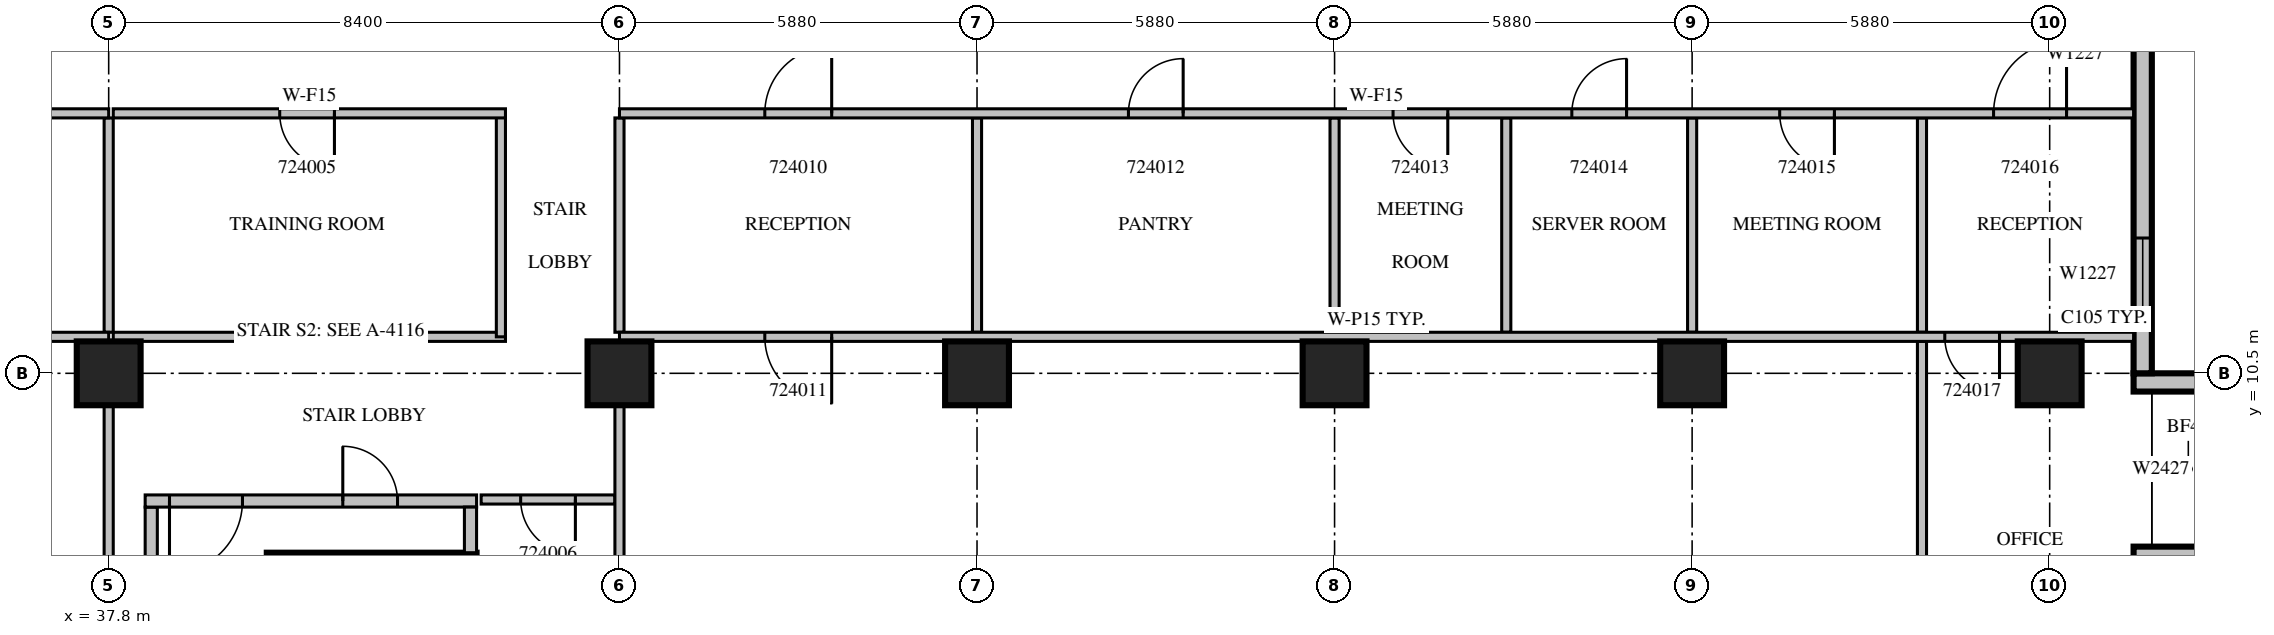
"""IFC4 building model, lengths in metres.
Left out: names, types, materials, properties, quantities, classifications, styles, units other than length and angle.
Written with IfcOpenShell. Run it as: python <this file> out.ifc"""

import sys

from ifc_helpers import new_model, si_unit, direction, frame, frame_2d, origin, origin_2d, place, context, subcontext, project, spatial, rectangle, extrude, source, transform, mapped, element, fill, save


model = new_model("IFC4")
c1 = context("Model", 3, precision=1e-05, world=origin(), true_north=direction((0.0, 1.0)))
c2 = subcontext(c1, "Body", "Model", "MODEL_VIEW")
j1 = project(units=[si_unit("LENGTHUNIT", "METRE"), si_unit("PLANEANGLEUNIT", "RADIAN")], contexts=[c1])
p1 = place(None, origin())
s1 = spatial("IfcSite", under=j1, at=p1, CompositionType="ELEMENT")
p2 = place(p1, origin())
s2 = spatial("IfcBuilding", under=s1, at=p2, CompositionType="ELEMENT")
p3 = place(p2, frame((0.0, 0.0, 111.9)))
s3 = spatial("IfcBuildingStorey", under=s2, at=p3, CompositionType="ELEMENT", Elevation=111.9)
m1 = source(origin(), c2, "Body", "SweptSolid", [
    extrude(rectangle(XDim=1.05, YDim=1.05, at=origin_2d()), origin(), (0.0, 0.0, 1.0), 4.2),
])
for number, where, z_axis, x_axis in (
    (1, (37.8, 10.5, 0.0), (0.0, 0.0, 1.0), (1.0, 0.0, 0.0)),
    (2, (46.2, 10.5, 0.0), (0.0, 0.0, 1.0), (1.0, 0.0, 0.0)),
    (3, (52.08, 10.5, 0.0), (0.0, 0.0, 1.0), (1.0, 0.0, 0.0)),
    (4, (57.96, 10.5, 0.0), (0.0, 0.0, 1.0), (1.0, 0.0, 0.0)),
    (5, (63.84, 10.5, 0.0), (0.0, 0.0, 1.0), (1.0, 0.0, 0.0)),
    (6, (69.72, 10.5, 0.0), (0.0, 0.0, 1.0), (1.0, 0.0, 0.0)),
):
    element("IfcColumn", number, at=place(p3, frame(where, z_axis=z_axis, x_axis=x_axis)), inside=s3, PredefinedType="COLUMN", context=c2, shape_type="MappedRepresentation", body=[
        mapped(m1, transform((0.0, 0.0, 0.0), scale=1.0)),
    ])
m2 = source(origin(), c2, "Body", "SweptSolid", [
    extrude(rectangle(XDim=1.2, YDim=0.3, at=frame_2d((0.6, 0.0))), origin(), (0.0, 0.0, 1.0), 3.8),
])
for number, where, z_axis, x_axis in (
    (7, (71.1, 7.5, 0.0), (0.0, 0.0, 1.0), (1.0, 0.0, 0.0)),
    (8, (71.1, 10.35, 0.0), (0.0, 0.0, 1.0), (1.0, 0.0, 0.0)),
):
    element("IfcWall", number, at=place(p3, frame(where, z_axis=z_axis, x_axis=x_axis)), inside=s3, PredefinedType="STANDARD", context=c2, shape_type="MappedRepresentation", body=[
        mapped(m2, transform((0.0, 0.0, 0.0), scale=1.0)),
    ])
m3 = source(origin(), c2, "Body", "SweptSolid", [
    extrude(rectangle(XDim=6.3, YDim=0.3, at=frame_2d((3.15, 0.0))), origin(), (0.0, 0.0, 1.0), 3.8),
])
p4 = place(p3, frame((71.25, 10.5, 0.0), z_axis=(0.0, 0.0, 1.0), x_axis=(0.0, 1.0, 0.0)))
e9 = element("IfcWall", 9, at=p4, inside=s3, PredefinedType="STANDARD", context=c2, shape_type="MappedRepresentation", body=[
    mapped(m3, transform((0.0, 0.0, 0.0), scale=1.0)),
])
m4 = source(origin(), c2, "Body", "SweptSolid", [
    extrude(rectangle(XDim=1.2, YDim=2.7, at=frame_2d((0.6, 1.35))), frame((0.0, 0.16, 0.0), z_axis=(0.0, -1.0, 0.0), x_axis=(1.0, 0.0, 0.0)), (0.0, 0.0, 1.0), 0.32),
])
p5 = place(p4, frame((1.025, 0.0, 0.6)))
e10 = element("IfcOpeningElement", 10, at=p5, cuts=e9, PredefinedType="OPENING", context=c2, shape_type="MappedRepresentation", body=[
    mapped(m4, transform((0.0, 0.0, 0.0), scale=1.0)),
])
m5 = source(origin(), c2, "Body", "SweptSolid", [
    extrude(rectangle(XDim=3.45, YDim=0.25, at=frame_2d((1.725, 0.0))), origin(), (0.0, 0.0, 1.0), 3.8),
])
p6 = place(p3, frame((40.4, 7.425, 0.0), z_axis=(0.0, 0.0, 1.0), x_axis=(1.0, 0.0, 0.0)))
e11 = element("IfcWall", 11, at=p6, inside=s3, PredefinedType="SOLIDWALL", context=c2, shape_type="MappedRepresentation", body=[
    mapped(m5, transform((0.0, 0.0, 0.0), scale=1.0)),
])
m6 = source(origin(), c2, "Body", "SweptSolid", [
    extrude(rectangle(XDim=8.0, YDim=0.2, at=frame_2d((4.0, 0.0))), origin(), (0.0, 0.0, 1.0), 3.8),
])
p7 = place(p3, frame((38.5, 0.3, 0.0), z_axis=(0.0, 0.0, 1.0), x_axis=(0.0, 1.0, 0.0)))
e12 = element("IfcWall", 12, at=p7, inside=s3, PredefinedType="PARTITIONING", context=c2, shape_type="MappedRepresentation", body=[
    mapped(m6, transform((0.0, 0.0, 0.0), scale=1.0)),
])
m7 = source(origin(), c2, "Body", "SweptSolid", [
    extrude(rectangle(XDim=5.45, YDim=0.2, at=frame_2d((2.725, 0.0))), origin(), (0.0, 0.0, 1.0), 3.8),
])
p8 = place(p3, frame((38.4, 8.4, 0.0), z_axis=(0.0, 0.0, 1.0), x_axis=(1.0, 0.0, 0.0)))
e13 = element("IfcWall", 13, at=p8, inside=s3, PredefinedType="PARTITIONING", context=c2, shape_type="MappedRepresentation", body=[
    mapped(m7, transform((0.0, 0.0, 0.0), scale=1.0)),
])
m8 = source(origin(), c2, "Body", "SweptSolid", [
    extrude(rectangle(XDim=1.2, YDim=2.1, at=frame_2d((0.6, 1.05))), frame((0.0, 0.11, 0.0), z_axis=(0.0, -1.0, 0.0), x_axis=(1.0, 0.0, 0.0)), (0.0, 0.0, 1.0), 0.22),
])
p9 = place(p8, frame((0.4, 0.0, 0.0)))
e14 = element("IfcOpeningElement", 14, at=p9, cuts=e13, PredefinedType="OPENING", context=c2, shape_type="MappedRepresentation", body=[
    mapped(m8, transform((0.0, 0.0, 0.0), scale=1.0)),
])
m9 = source(origin(), c2, "Body", "SweptSolid", [
    extrude(rectangle(XDim=0.9, YDim=2.1, at=frame_2d((0.45, 1.05))), frame((0.0, 0.11, 0.0), z_axis=(0.0, -1.0, 0.0), x_axis=(1.0, 0.0, 0.0)), (0.0, 0.0, 1.0), 0.22),
])
p10 = place(p8, frame((3.25, 0.0, 0.0)))
e15 = element("IfcOpeningElement", 15, at=p10, cuts=e13, PredefinedType="OPENING", context=c2, shape_type="MappedRepresentation", body=[
    mapped(m9, transform((0.0, 0.0, 0.0), scale=1.0)),
])
m10 = source(origin(), c2, "Body", "SweptSolid", [
    extrude(rectangle(XDim=0.75, YDim=0.2, at=frame_2d((0.375, 0.0))), origin(), (0.0, 0.0, 1.0), 3.8),
])
p11 = place(p3, frame((43.75, 7.55, 0.0), z_axis=(0.0, 0.0, 1.0), x_axis=(0.0, 1.0, 0.0)))
e16 = element("IfcWall", 16, at=p11, inside=s3, PredefinedType="PARTITIONING", context=c2, shape_type="MappedRepresentation", body=[
    mapped(m10, transform((0.0, 0.0, 0.0), scale=1.0)),
])
m11 = source(origin(), c2, "Body", "SweptSolid", [
    extrude(rectangle(XDim=6.45, YDim=0.15, at=frame_2d((3.225, 0.0))), origin(), (0.0, 0.0, 1.0), 3.8),
])
p12 = place(p3, frame((37.875, 11.1, 0.0), z_axis=(0.0, 0.0, 1.0), x_axis=(1.0, 0.0, 0.0)))
e17 = element("IfcWall", 17, at=p12, inside=s3, PredefinedType="PARTITIONING", context=c2, shape_type="MappedRepresentation", body=[
    mapped(m11, transform((0.0, 0.0, 0.0), scale=1.0)),
])
m12 = source(origin(), c2, "Body", "SweptSolid", [
    extrude(rectangle(XDim=3.675, YDim=0.15, at=frame_2d((1.837, 0.0))), origin(), (0.0, 0.0, 1.0), 3.8),
])
p13 = place(p3, frame((44.25, 11.1, 0.0), z_axis=(0.0, 0.0, 1.0), x_axis=(0.0, 1.0, 0.0)))
e18 = element("IfcWall", 18, at=p13, inside=s3, PredefinedType="PARTITIONING", context=c2, shape_type="MappedRepresentation", body=[
    mapped(m12, transform((0.0, 0.0, 0.0), scale=1.0)),
])
p14 = place(p3, frame((44.325, 14.775, 0.0), z_axis=(0.0, 0.0, 1.0), x_axis=(-1.0, 0.0, 0.0)))
e19 = element("IfcWall", 19, at=p14, inside=s3, PredefinedType="PARTITIONING", context=c2, shape_type="MappedRepresentation", body=[
    mapped(m11, transform((0.0, 0.0, 0.0), scale=1.0)),
])
m13 = source(origin(), c2, "Body", "SweptSolid", [
    extrude(rectangle(XDim=0.9, YDim=2.1, at=frame_2d((0.45, 1.05))), frame((0.0, 0.085, 0.0), z_axis=(0.0, -1.0, 0.0), x_axis=(1.0, 0.0, 0.0)), (0.0, 0.0, 1.0), 0.17),
])
p15 = place(p14, frame((2.812, 0.0, 0.0)))
e20 = element("IfcOpeningElement", 20, at=p15, cuts=e19, PredefinedType="OPENING", context=c2, shape_type="MappedRepresentation", body=[
    mapped(m13, transform((0.0, 0.0, 0.0), scale=1.0)),
])
m14 = source(origin(), c2, "Body", "SweptSolid", [
    extrude(rectangle(XDim=2.2, YDim=0.15, at=frame_2d((1.1, 0.0))), origin(), (0.0, 0.0, 1.0), 3.8),
])
p16 = place(p3, frame((46.125, 8.425, 0.0), z_axis=(0.0, 0.0, 1.0), x_axis=(-1.0, 0.0, 0.0)))
e21 = element("IfcWall", 21, at=p16, inside=s3, PredefinedType="PARTITIONING", context=c2, shape_type="MappedRepresentation", body=[
    mapped(m14, transform((0.0, 0.0, 0.0), scale=1.0)),
])
p17 = place(p16, frame((0.65, 0.0, 0.0)))
e22 = element("IfcOpeningElement", 22, at=p17, cuts=e21, PredefinedType="OPENING", context=c2, shape_type="MappedRepresentation", body=[
    mapped(m13, transform((0.0, 0.0, 0.0), scale=1.0)),
])
m15 = source(origin(), c2, "Body", "SweptSolid", [
    extrude(rectangle(XDim=8.927, YDim=0.15, at=frame_2d((4.463, 0.0))), origin(), (0.0, 0.0, 1.0), 3.8),
])
p18 = place(p3, frame((37.8, 1.049, 0.0), z_axis=(0.0, 0.0, 1.0), x_axis=(0.0, 1.0, 0.0)))
e23 = element("IfcWall", 23, at=p18, inside=s3, PredefinedType="PARTITIONING", context=c2, shape_type="MappedRepresentation", body=[
    mapped(m15, transform((0.0, 0.0, 0.0), scale=1.0)),
])
m16 = source(origin(), c2, "Body", "SweptSolid", [
    extrude(rectangle(XDim=3.525, YDim=0.15, at=frame_2d((1.762, 0.0))), origin(), (0.0, 0.0, 1.0), 3.8),
])
p19 = place(p3, frame((37.8, 11.175, 0.0), z_axis=(0.0, 0.0, 1.0), x_axis=(0.0, 1.0, 0.0)))
e24 = element("IfcWall", 24, at=p19, inside=s3, PredefinedType="PARTITIONING", context=c2, shape_type="MappedRepresentation", body=[
    mapped(m16, transform((0.0, 0.0, 0.0), scale=1.0)),
])
m17 = source(origin(), c2, "Body", "SweptSolid", [
    extrude(rectangle(XDim=8.4, YDim=0.15, at=frame_2d((4.2, 0.0))), origin(), (0.0, 0.0, 1.0), 3.8),
])
p20 = place(p3, frame((37.8, 11.1, 0.0), z_axis=(0.0, 0.0, 1.0), x_axis=(-1.0, 0.0, 0.0)))
e25 = element("IfcWall", 25, at=p20, inside=s3, PredefinedType="PARTITIONING", context=c2, shape_type="MappedRepresentation", body=[
    mapped(m17, transform((0.0, 0.0, 0.0), scale=1.0)),
])
p21 = place(p20, frame((5.575, 0.0, 0.0)))
e26 = element("IfcOpeningElement", 26, at=p21, cuts=e25, PredefinedType="OPENING", context=c2, shape_type="MappedRepresentation", body=[
    mapped(m13, transform((0.0, 0.0, 0.0), scale=1.0)),
])
p22 = place(p20, frame((1.875, 0.0, 0.0)))
e27 = element("IfcOpeningElement", 27, at=p22, cuts=e25, PredefinedType="OPENING", context=c2, shape_type="MappedRepresentation", body=[
    mapped(m13, transform((0.0, 0.0, 0.0), scale=1.0)),
])
for number, where, z_axis, x_axis in (
    (28, (52.08, 11.175, 0.0), (0.0, 0.0, 1.0), (0.0, 1.0, 0.0)),
    (29, (57.96, 11.175, 0.0), (0.0, 0.0, 1.0), (0.0, 1.0, 0.0)),
    (30, (60.784, 11.175, 0.0), (0.0, 0.0, 1.0), (0.0, 1.0, 0.0)),
    (31, (63.84, 11.175, 0.0), (0.0, 0.0, 1.0), (0.0, 1.0, 0.0)),
):
    element("IfcWall", number, at=place(p3, frame(where, z_axis=z_axis, x_axis=x_axis)), inside=s3, PredefinedType="PARTITIONING", context=c2, shape_type="MappedRepresentation", body=[
        mapped(m16, transform((0.0, 0.0, 0.0), scale=1.0)),
    ])
p23 = place(p3, frame((46.2, 1.049, 0.0), z_axis=(0.0, 0.0, 1.0), x_axis=(0.0, 1.0, 0.0)))
e32 = element("IfcWall", 32, at=p23, inside=s3, PredefinedType="PARTITIONING", context=c2, shape_type="MappedRepresentation", body=[
    mapped(m15, transform((0.0, 0.0, 0.0), scale=1.0)),
])
p24 = place(p3, frame((46.2, 11.175, 0.0), z_axis=(0.0, 0.0, 1.0), x_axis=(0.0, 1.0, 0.0)))
e33 = element("IfcWall", 33, at=p24, inside=s3, PredefinedType="PARTITIONING", context=c2, shape_type="MappedRepresentation", body=[
    mapped(m16, transform((0.0, 0.0, 0.0), scale=1.0)),
])
m18 = source(origin(), c2, "Body", "SweptSolid", [
    extrude(rectangle(XDim=6.62, YDim=0.15, at=frame_2d((3.31, 0.0))), origin(), (0.0, 0.0, 1.0), 3.8),
])
p25 = place(p3, frame((67.62, 4.405, 0.0), z_axis=(0.0, 0.0, 1.0), x_axis=(0.0, 1.0, 0.0)))
e34 = element("IfcWall", 34, at=p25, inside=s3, PredefinedType="PARTITIONING", context=c2, shape_type="MappedRepresentation", body=[
    mapped(m18, transform((0.0, 0.0, 0.0), scale=1.0)),
])
p26 = place(p3, frame((67.62, 11.175, 0.0), z_axis=(0.0, 0.0, 1.0), x_axis=(0.0, 1.0, 0.0)))
e35 = element("IfcWall", 35, at=p26, inside=s3, PredefinedType="PARTITIONING", context=c2, shape_type="MappedRepresentation", body=[
    mapped(m16, transform((0.0, 0.0, 0.0), scale=1.0)),
])
m19 = source(origin(), c2, "Body", "SweptSolid", [
    extrude(rectangle(XDim=24.9, YDim=0.15, at=frame_2d((12.45, 0.0))), origin(), (0.0, 0.0, 1.0), 3.8),
])
p27 = place(p3, frame((71.1, 11.1, 0.0), z_axis=(0.0, 0.0, 1.0), x_axis=(-1.0, 0.0, 0.0)))
e36 = element("IfcWall", 36, at=p27, inside=s3, PredefinedType="PARTITIONING", context=c2, shape_type="MappedRepresentation", body=[
    mapped(m19, transform((0.0, 0.0, 0.0), scale=1.0)),
])
m20 = source(origin(), c2, "Body", "SweptSolid", [
    extrude(rectangle(XDim=1.1, YDim=2.1, at=frame_2d((0.55, 1.05))), frame((0.0, 0.085, 0.0), z_axis=(0.0, -1.0, 0.0), x_axis=(1.0, 0.0, 0.0)), (0.0, 0.0, 1.0), 0.17),
])
p28 = place(p27, frame((21.41, 0.0, 0.0)))
e37 = element("IfcOpeningElement", 37, at=p28, cuts=e36, PredefinedType="OPENING", context=c2, shape_type="MappedRepresentation", body=[
    mapped(m20, transform((0.0, 0.0, 0.0), scale=1.0)),
])
p29 = place(p27, frame((2.205, 0.0, 0.0)))
e38 = element("IfcOpeningElement", 38, at=p29, cuts=e36, PredefinedType="OPENING", context=c2, shape_type="MappedRepresentation", body=[
    mapped(m13, transform((0.0, 0.0, 0.0), scale=1.0)),
])
p30 = place(p3, frame((37.8, 14.775, 0.0), z_axis=(0.0, 0.0, 1.0), x_axis=(-1.0, 0.0, 0.0)))
e39 = element("IfcWall", 39, at=p30, inside=s3, PredefinedType="PARTITIONING", context=c2, shape_type="MappedRepresentation", body=[
    mapped(m17, transform((0.0, 0.0, 0.0), scale=1.0)),
])
m21 = source(origin(), c2, "Body", "SweptSolid", [
    extrude(rectangle(XDim=1.2, YDim=2.1, at=frame_2d((0.6, 1.05))), frame((0.0, 0.085, 0.0), z_axis=(0.0, -1.0, 0.0), x_axis=(1.0, 0.0, 0.0)), (0.0, 0.0, 1.0), 0.17),
])
p31 = place(p30, frame((3.6, 0.0, 0.0)))
e40 = element("IfcOpeningElement", 40, at=p31, cuts=e39, PredefinedType="OPENING", context=c2, shape_type="MappedRepresentation", body=[
    mapped(m21, transform((0.0, 0.0, 0.0), scale=1.0)),
])
p32 = place(p3, frame((71.1, 14.775, 0.0), z_axis=(0.0, 0.0, 1.0), x_axis=(-1.0, 0.0, 0.0)))
e41 = element("IfcWall", 41, at=p32, inside=s3, PredefinedType="PARTITIONING", context=c2, shape_type="MappedRepresentation", body=[
    mapped(m19, transform((0.0, 0.0, 0.0), scale=1.0)),
])
p33 = place(p32, frame((21.41, 0.0, 0.0)))
e42 = element("IfcOpeningElement", 42, at=p33, cuts=e41, PredefinedType="OPENING", context=c2, shape_type="MappedRepresentation", body=[
    mapped(m20, transform((0.0, 0.0, 0.0), scale=1.0)),
])
p34 = place(p32, frame((15.63, 0.0, 0.0)))
e43 = element("IfcOpeningElement", 43, at=p34, cuts=e41, PredefinedType="OPENING", context=c2, shape_type="MappedRepresentation", body=[
    mapped(m13, transform((0.0, 0.0, 0.0), scale=1.0)),
])
p35 = place(p32, frame((11.278, 0.0, 0.0)))
e44 = element("IfcOpeningElement", 44, at=p35, cuts=e41, PredefinedType="OPENING", context=c2, shape_type="MappedRepresentation", body=[
    mapped(m13, transform((0.0, 0.0, 0.0), scale=1.0)),
])
p36 = place(p32, frame((8.338, 0.0, 0.0)))
e45 = element("IfcOpeningElement", 45, at=p36, cuts=e41, PredefinedType="OPENING", context=c2, shape_type="MappedRepresentation", body=[
    mapped(m13, transform((0.0, 0.0, 0.0), scale=1.0)),
])
p37 = place(p32, frame((4.92, 0.0, 0.0)))
e46 = element("IfcOpeningElement", 46, at=p37, cuts=e41, PredefinedType="OPENING", context=c2, shape_type="MappedRepresentation", body=[
    mapped(m13, transform((0.0, 0.0, 0.0), scale=1.0)),
])
p38 = place(p32, frame((1.103, 0.0, 0.0)))
e47 = element("IfcOpeningElement", 47, at=p38, cuts=e41, PredefinedType="OPENING", context=c2, shape_type="MappedRepresentation", body=[
    mapped(m21, transform((0.0, 0.0, 0.0), scale=1.0)),
])
m22 = source(origin(), c2, "Body", "SweptSolid", [
    extrude(rectangle(XDim=1.2, YDim=2.7, at=frame_2d((0.6, 1.35))), frame((0.0, 0.03, 0.0), z_axis=(0.0, -1.0, 0.0), x_axis=(1.0, 0.0, 0.0)), (0.0, 0.0, 1.0), 0.06),
])
p39 = place(p5, origin())
e48 = element("IfcWindow", 48, at=p39, inside=s3, PartitioningType="SINGLE_PANEL", PredefinedType="WINDOW", context=c2, shape_type="MappedRepresentation", body=[
    mapped(m22, transform((0.0, 0.0, 0.0), scale=1.0)),
])
fill(e10, e48)
m23 = source(origin(), c2, "Body", "SweptSolid", [
    extrude(rectangle(XDim=1.2, YDim=2.1, at=frame_2d((0.6, 1.05))), frame((0.0, 0.025, 0.0), z_axis=(0.0, -1.0, 0.0), x_axis=(1.0, 0.0, 0.0)), (0.0, 0.0, 1.0), 0.05),
])
p40 = place(p9, origin())
e49 = element("IfcDoor", 49, at=p40, inside=s3, OperationType="SINGLE_SWING_RIGHT", PredefinedType="DOOR", context=c2, shape_type="MappedRepresentation", body=[
    mapped(m23, transform((0.0, 0.0, 0.0), scale=1.0)),
])
fill(e14, e49)
m24 = source(origin(), c2, "Body", "SweptSolid", [
    extrude(rectangle(XDim=0.9, YDim=2.1, at=frame_2d((0.45, 1.05))), frame((0.0, 0.025, 0.0), z_axis=(0.0, -1.0, 0.0), x_axis=(1.0, 0.0, 0.0)), (0.0, 0.0, 1.0), 0.05),
])
p41 = place(p10, origin())
e50 = element("IfcDoor", 50, at=p41, inside=s3, OperationType="SINGLE_SWING_LEFT", PredefinedType="DOOR", context=c2, shape_type="MappedRepresentation", body=[
    mapped(m24, transform((0.0, 0.0, 0.0), scale=1.0)),
])
fill(e15, e50)
p42 = place(p15, origin())
e51 = element("IfcDoor", 51, at=p42, inside=s3, OperationType="SINGLE_SWING_LEFT", PredefinedType="DOOR", context=c2, shape_type="MappedRepresentation", body=[
    mapped(m24, transform((0.0, 0.0, 0.0), scale=1.0)),
])
fill(e20, e51)
p43 = place(p17, origin())
e52 = element("IfcDoor", 52, at=p43, inside=s3, OperationType="SINGLE_SWING_LEFT", PredefinedType="DOOR", context=c2, shape_type="MappedRepresentation", body=[
    mapped(m24, transform((0.0, 0.0, 0.0), scale=1.0)),
])
fill(e22, e52)
m25 = source(origin(), c2, "Body", "SweptSolid", [
    extrude(rectangle(XDim=1.1, YDim=2.1, at=frame_2d((0.55, 1.05))), frame((0.0, 0.025, 0.0), z_axis=(0.0, -1.0, 0.0), x_axis=(1.0, 0.0, 0.0)), (0.0, 0.0, 1.0), 0.05),
])
p44 = place(p33, origin())
e53 = element("IfcDoor", 53, at=p44, inside=s3, OperationType="SINGLE_SWING_RIGHT", PredefinedType="DOOR", context=c2, shape_type="MappedRepresentation", body=[
    mapped(m25, transform((0.0, 0.0, 0.0), scale=1.0)),
])
fill(e42, e53)
p45 = place(p28, origin())
e54 = element("IfcDoor", 54, at=p45, inside=s3, OperationType="SINGLE_SWING_LEFT", PredefinedType="DOOR", context=c2, shape_type="MappedRepresentation", body=[
    mapped(m25, transform((0.0, 0.0, 0.0), scale=1.0)),
])
fill(e37, e54)
p46 = place(p34, origin())
e55 = element("IfcDoor", 55, at=p46, inside=s3, OperationType="SINGLE_SWING_RIGHT", PredefinedType="DOOR", context=c2, shape_type="MappedRepresentation", body=[
    mapped(m24, transform((0.0, 0.0, 0.0), scale=1.0)),
])
fill(e43, e55)
p47 = place(p35, origin())
e56 = element("IfcDoor", 56, at=p47, inside=s3, OperationType="SINGLE_SWING_LEFT", PredefinedType="DOOR", context=c2, shape_type="MappedRepresentation", body=[
    mapped(m24, transform((0.0, 0.0, 0.0), scale=1.0)),
])
fill(e44, e56)
p48 = place(p36, origin())
e57 = element("IfcDoor", 57, at=p48, inside=s3, OperationType="SINGLE_SWING_RIGHT", PredefinedType="DOOR", context=c2, shape_type="MappedRepresentation", body=[
    mapped(m24, transform((0.0, 0.0, 0.0), scale=1.0)),
])
fill(e45, e57)
p49 = place(p37, origin())
e58 = element("IfcDoor", 58, at=p49, inside=s3, OperationType="SINGLE_SWING_LEFT", PredefinedType="DOOR", context=c2, shape_type="MappedRepresentation", body=[
    mapped(m24, transform((0.0, 0.0, 0.0), scale=1.0)),
])
fill(e46, e58)
p50 = place(p38, origin())
e59 = element("IfcDoor", 59, at=p50, inside=s3, OperationType="SINGLE_SWING_RIGHT", PredefinedType="DOOR", context=c2, shape_type="MappedRepresentation", body=[
    mapped(m23, transform((0.0, 0.0, 0.0), scale=1.0)),
])
fill(e47, e59)
p51 = place(p29, origin())
e60 = element("IfcDoor", 60, at=p51, inside=s3, OperationType="SINGLE_SWING_LEFT", PredefinedType="DOOR", context=c2, shape_type="MappedRepresentation", body=[
    mapped(m24, transform((0.0, 0.0, 0.0), scale=1.0)),
])
fill(e38, e60)
save(model, sys.argv[1])
